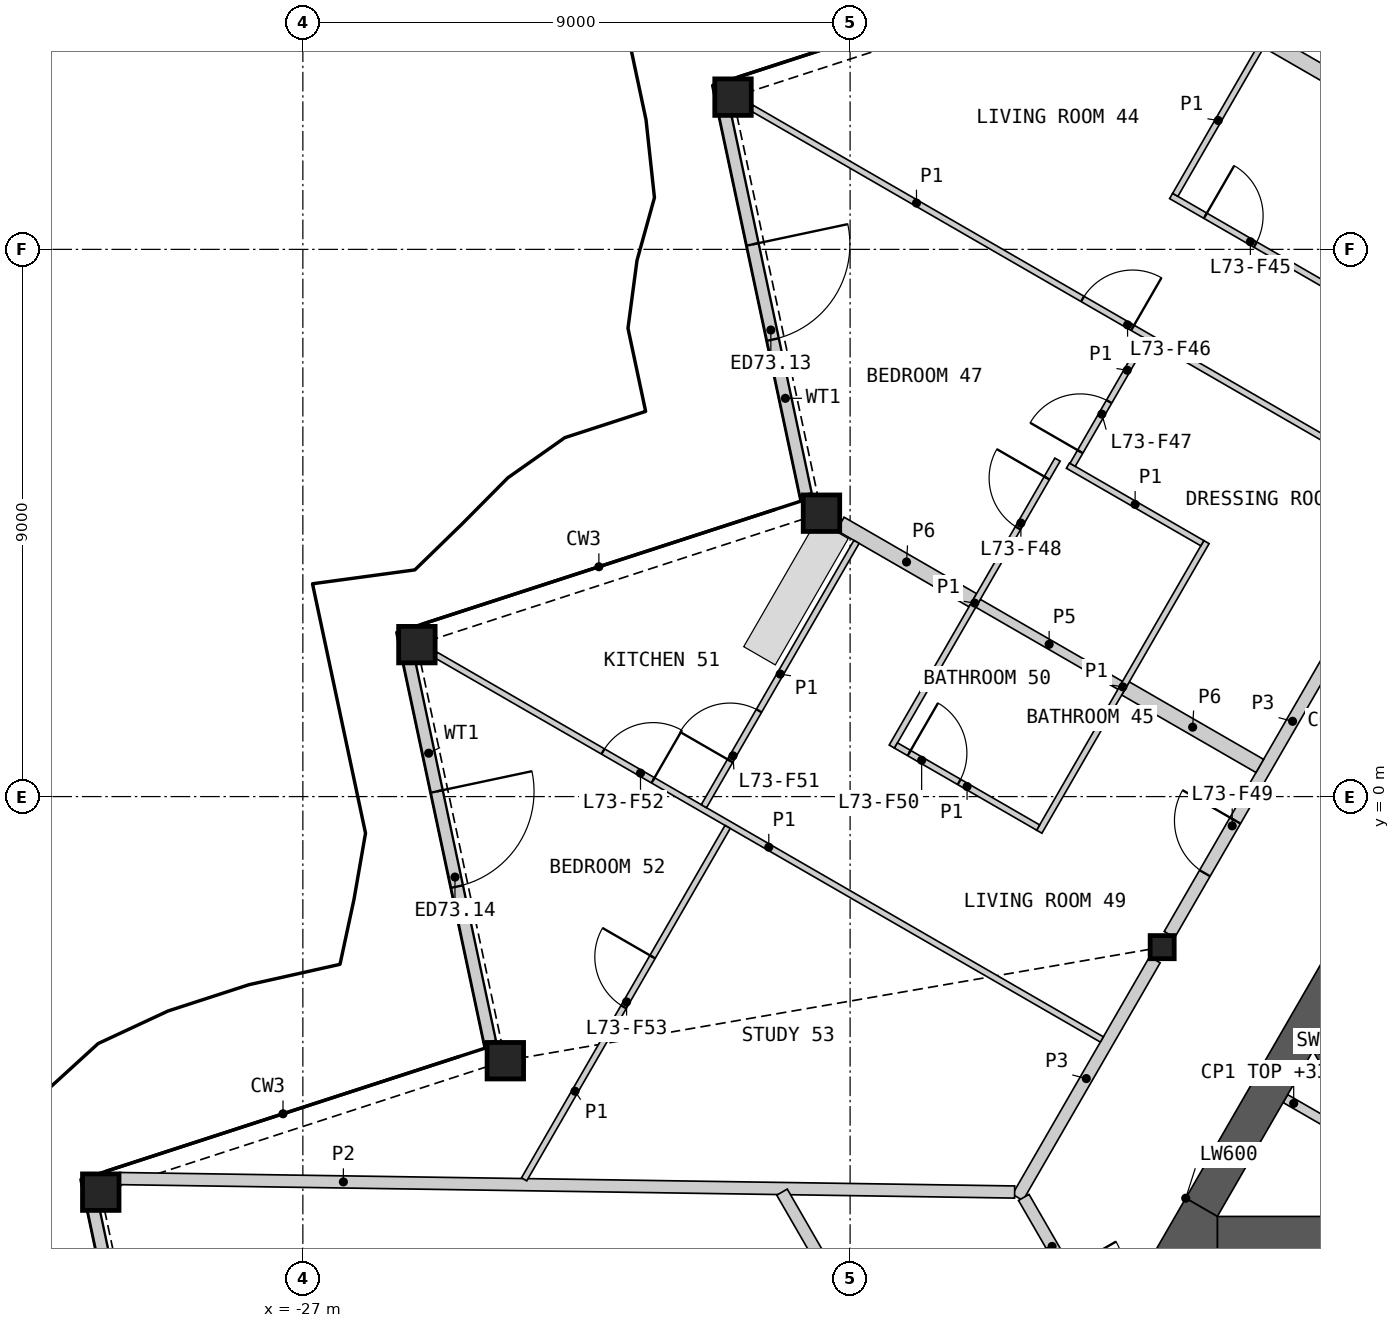
"""IFC4 building model, lengths in metres.
Left out: names, types, materials, properties, quantities, classifications, styles, units other than length and angle.
Written with IfcOpenShell. Run it as: python <this file> out.ifc"""

import sys

from ifc_helpers import new_model, si_unit, direction, frame, frame_2d, origin, origin_2d, place, context, subcontext, project, spatial, polyline, rectangle, hollow_rectangle, i_section, outline, extrude, element, fill, save


model = new_model("IFC4")
c1 = context("Model", 3, precision=1e-05, world=origin(), true_north=direction((0.0, 1.0)))
c2 = subcontext(c1, "Body", "Model", "MODEL_VIEW")
j1 = project(units=[si_unit("LENGTHUNIT", "METRE"), si_unit("PLANEANGLEUNIT", "RADIAN")], contexts=[c1])
p1 = place(None, origin())
s1 = spatial("IfcSite", under=j1, at=p1, CompositionType="ELEMENT")
p2 = place(p1, origin())
s2 = spatial("IfcBuilding", under=s1, at=p2, CompositionType="ELEMENT")
p3 = place(p2, frame((0.0, 0.0, 329.0)))
s3 = spatial("IfcBuildingStorey", under=s2, at=p3, CompositionType="ELEMENT", Elevation=329.0)
for number, where, z_axis, x_axis in (
    (1, (-19.926, 11.504, 0.0), (0.0, 0.0, 1.0), (1.0, 0.0, 0.0)),
    (2, (-18.471, 4.661, 0.0), (0.0, 0.0, 1.0), (1.0, 0.0, 0.0)),
    (3, (-25.125, 2.499, 0.0), (0.0, 0.0, 1.0), (1.0, 0.0, 0.0)),
    (4, (-23.67, -4.344, 0.0), (0.0, 0.0, 1.0), (1.0, 0.0, 0.0)),
    (5, (-30.324, -6.506, 0.0), (0.0, 0.0, 1.0), (1.0, 0.0, 0.0)),
):
    element("IfcColumn", number, at=place(p3, frame(where, z_axis=z_axis, x_axis=x_axis)), inside=s3, PredefinedType="COLUMN", context=c2, shape_type="SweptSolid", body=[
        extrude(hollow_rectangle(XDim=0.6, YDim=0.6, WallThickness=0.04, at=origin_2d()), origin(), (0.0, 0.0, 1.0), 3.4),
    ])
p4 = place(p3, frame((-12.868, -2.476, 0.0), z_axis=(0.0, 0.0, 1.0), x_axis=(1.0, 0.0, 0.0)))
e6 = element("IfcColumn", 6, at=p4, inside=s3, PredefinedType="COLUMN", context=c2, shape_type="SweptSolid", body=[
    extrude(i_section(OverallWidth=0.396, OverallDepth=0.381, WebThickness=0.019, FlangeThickness=0.03, at=origin_2d()), origin(), (0.0, 0.0, 1.0), 3.4),
])
p5 = place(p3, frame((-20.073, 11.294, 0.0), z_axis=(0.0, 0.0, 1.0), x_axis=(0.207893978909, -0.978151365349, 0.0)))
e7 = element("IfcWall", 7, at=p5, inside=s3, PredefinedType="SOLIDWALL", context=c2, shape_type="SweptSolid", body=[
    extrude(rectangle(XDim=6.466, YDim=0.2, at=frame_2d((3.233, 0.0))), origin(), (0.0, 0.0, 1.0), 2.488),
])
p6 = place(p5, frame((2.261, 0.0, 0.0)))
e8 = element("IfcOpeningElement", 8, at=p6, cuts=e7, PredefinedType="OPENING", context=c2, shape_type="SweptSolid", body=[
    extrude(rectangle(XDim=1.6, YDim=2.25, at=frame_2d((0.8, 1.125))), frame((0.0, 0.11, 0.0), z_axis=(0.0, -1.0, 0.0), x_axis=(1.0, 0.0, 0.0)), (0.0, 0.0, 1.0), 0.22),
])
p7 = place(p3, frame((-25.268, 2.297, 0.0), z_axis=(0.0, 0.0, 1.0), x_axis=(0.207937232358, -0.978142171363, 0.0)))
e9 = element("IfcWall", 9, at=p7, inside=s3, PredefinedType="SOLIDWALL", context=c2, shape_type="SweptSolid", body=[
    extrude(rectangle(XDim=6.474, YDim=0.2, at=frame_2d((3.237, 0.0))), origin(), (0.0, 0.0, 1.0), 2.488),
])
p8 = place(p7, frame((2.261, 0.0, 0.0)))
e10 = element("IfcOpeningElement", 10, at=p8, cuts=e9, PredefinedType="OPENING", context=c2, shape_type="SweptSolid", body=[
    extrude(rectangle(XDim=1.6, YDim=2.25, at=frame_2d((0.8, 1.125))), frame((0.0, 0.11, 0.0), z_axis=(0.0, -1.0, 0.0), x_axis=(1.0, 0.0, 0.0)), (0.0, 0.0, 1.0), 0.22),
])
p9 = place(p3, frame((-30.462, -6.701, 0.0), z_axis=(0.0, 0.0, 1.0), x_axis=(0.207915966693, -0.978146691859, 0.0)))
e11 = element("IfcWall", 11, at=p9, inside=s3, PredefinedType="SOLIDWALL", context=c2, shape_type="SweptSolid", body=[
    extrude(rectangle(XDim=6.482, YDim=0.2, at=frame_2d((3.241, 0.0))), origin(), (0.0, 0.0, 1.0), 2.488),
])
p10 = place(p9, frame((2.261, 0.0, 0.0)))
e12 = element("IfcOpeningElement", 12, at=p10, cuts=e11, PredefinedType="OPENING", context=c2, shape_type="SweptSolid", body=[
    extrude(rectangle(XDim=1.6, YDim=2.25, at=frame_2d((0.8, 1.125))), frame((0.0, 0.11, 0.0), z_axis=(0.0, -1.0, 0.0), x_axis=(1.0, 0.0, 0.0)), (0.0, 0.0, 1.0), 0.22),
])
p11 = place(p3, origin())
e13 = element("IfcWall", 13, at=p11, inside=s3, PredefinedType="SHEAR", context=c2, shape_type="SweptSolid", body=[
    extrude(outline(polyline([(-5.307, -1.281), (-10.374, -4.206), (-10.032, -4.298), (-5.182, -1.498), (-5.307, -1.281)])), origin(), (0.0, 0.0, 1.0), 3.1),
])
p12 = place(p3, origin())
e14 = element("IfcWall", 14, at=p12, inside=s3, PredefinedType="SHEAR", context=c2, shape_type="SweptSolid", body=[
    extrude(outline(polyline([(-10.374, -4.206), (-8.83, -6.881), (-8.738, -6.539), (-10.032, -4.298), (-10.374, -4.206)])), origin(), (0.0, 0.0, 1.0), 3.1),
])
p13 = place(p3, frame((-10.842, -4.967, 0.0), z_axis=(0.0, 0.0, 1.0), x_axis=(0.866098216386, -0.499873863663, 0.0)))
e15 = element("IfcWall", 15, at=p13, inside=s3, PredefinedType="PARTITIONING", context=c2, shape_type="SweptSolid", body=[
    extrude(rectangle(XDim=1.582, YDim=0.15, at=frame_2d((0.791, 0.0))), origin(), (0.0, 0.0, 1.0), 3.1),
])
p14 = place(p3, frame((-11.961, -7.206, 0.0), z_axis=(0.0, 0.0, 1.0), x_axis=(1.0, 0.0, 0.0)))
e16 = element("IfcWall", 16, at=p14, inside=s3, PredefinedType="SHEAR", context=c2, shape_type="SweptSolid", body=[
    extrude(rectangle(XDim=4.868, YDim=0.6, at=frame_2d((2.434, 0.0))), origin(), (0.0, 0.0, 1.0), 3.1),
])
p15 = place(p3, frame((-9.941, -2.807, 0.0), z_axis=(0.0, 0.0, 1.0), x_axis=(-0.500020646047, -0.866013483456, 0.0)))
e17 = element("IfcWall", 17, at=p15, inside=s3, PredefinedType="SHEAR", context=c2, shape_type="SweptSolid", body=[
    extrude(rectangle(XDim=4.559, YDim=0.6, at=frame_2d((2.28, 0.0))), origin(), (0.0, 0.0, 1.0), 3.1),
])
p16 = place(p3, origin())
e18 = element("IfcWall", 18, at=p16, inside=s3, PredefinedType="SHEAR", context=c2, shape_type="SweptSolid", body=[
    extrude(outline(polyline([(-12.48, -6.606), (-11.961, -6.906), (-11.961, -7.506), (-13.0, -7.506), (-12.48, -6.606)])), origin(), (0.0, 0.0, 1.0), 3.1),
])
p17 = place(p3, frame((-12.748, -2.269, 0.0), z_axis=(0.0, 0.0, 1.0), x_axis=(0.499984266882, 0.866034487114, 0.0)))
e19 = element("IfcWall", 19, at=p17, inside=s3, PredefinedType="PARTITIONING", context=c2, shape_type="SweptSolid", body=[
    extrude(rectangle(XDim=8.099, YDim=0.2, at=frame_2d((4.049, 0.0))), origin(), (0.0, 0.0, 1.0), 3.1),
])
p18 = place(p17, frame((1.164, 0.0, 0.0)))
e20 = element("IfcOpeningElement", 20, at=p18, cuts=e19, PredefinedType="OPENING", context=c2, shape_type="SweptSolid", body=[
    extrude(rectangle(XDim=1.0, YDim=2.1, at=frame_2d((0.5, 1.05))), frame((0.0, 0.11, 0.0), z_axis=(0.0, -1.0, 0.0), x_axis=(1.0, 0.0, 0.0)), (0.0, 0.0, 1.0), 0.22),
])
p19 = place(p3, frame((-12.962, 13.482, 0.0), z_axis=(0.0, 0.0, 1.0), x_axis=(0.866022671543, -0.50000473235, 0.0)))
e21 = element("IfcWall", 21, at=p19, inside=s3, PredefinedType="PARTITIONING", context=c2, shape_type="SweptSolid", body=[
    extrude(rectangle(XDim=7.961, YDim=0.25, at=frame_2d((3.98, 0.0))), origin(), (0.0, 0.0, 1.0), 2.33),
])
p20 = place(p3, frame((-15.244, -6.592, 0.0), z_axis=(0.0, 0.0, 1.0), x_axis=(0.49999094734, 0.866030630277, 0.0)))
e22 = element("IfcWall", 22, at=p20, inside=s3, PredefinedType="PARTITIONING", context=c2, shape_type="SweptSolid", body=[
    extrude(rectangle(XDim=4.513, YDim=0.2, at=frame_2d((2.256, 0.0))), origin(), (0.0, 0.0, 1.0), 3.1),
])
p21 = place(p3, frame((-15.144, -6.592, 0.0), z_axis=(0.0, 0.0, 1.0), x_axis=(0.499958791762, -0.866049194065, 0.0)))
e23 = element("IfcWall", 23, at=p21, inside=s3, PredefinedType="PARTITIONING", context=c2, shape_type="SweptSolid", body=[
    extrude(rectangle(XDim=3.726, YDim=0.2, at=frame_2d((1.863, 0.0))), origin(), (0.0, 0.0, 1.0), 3.1),
])
p22 = place(p21, frame((1.388, 0.0, 0.0)))
e24 = element("IfcOpeningElement", 24, at=p22, cuts=e23, PredefinedType="OPENING", context=c2, shape_type="SweptSolid", body=[
    extrude(rectangle(XDim=0.95, YDim=2.1, at=frame_2d((0.475, 1.05))), frame((0.0, 0.11, 0.0), z_axis=(0.0, -1.0, 0.0), x_axis=(1.0, 0.0, 0.0)), (0.0, 0.0, 1.0), 0.22),
])
p23 = place(p3, frame((-13.471, 1.779, 0.0), z_axis=(0.0, 0.0, 1.0), x_axis=(0.865989465428, -0.500062241894, 0.0)))
e25 = element("IfcWall", 25, at=p23, inside=s3, PredefinedType="PARTITIONING", context=c2, shape_type="SweptSolid", body=[
    extrude(rectangle(XDim=2.55, YDim=0.25, at=frame_2d((1.275, 0.0))), origin(), (0.0, 0.0, 1.0), 2.33),
])
p24 = place(p3, frame((-18.161, 4.487, 0.0), z_axis=(0.0, 0.0, 1.0), x_axis=(0.866012646713, -0.500022095245, 0.0)))
e26 = element("IfcWall", 26, at=p24, inside=s3, PredefinedType="PARTITIONING", context=c2, shape_type="SweptSolid", body=[
    extrude(rectangle(XDim=2.516, YDim=0.25, at=frame_2d((1.258, 0.0))), origin(), (0.0, 0.0, 1.0), 2.33),
])
p25 = place(p3, frame((-30.014, -6.282, 0.0), z_axis=(0.0, 0.0, 1.0), x_axis=(0.99988686643, -0.015041753265, 0.0)))
e27 = element("IfcWall", 27, at=p25, inside=s3, PredefinedType="PARTITIONING", context=c2, shape_type="SweptSolid", body=[
    extrude(rectangle(XDim=14.721, YDim=0.2, at=frame_2d((7.361, 0.0))), origin(), (0.0, 0.0, 1.0), 2.33),
])
p26 = place(p3, frame((-19.12, -6.506, 0.0), z_axis=(0.0, 0.0, 1.0), x_axis=(0.499978535015, -0.866037796245, 0.0)))
e28 = element("IfcWall", 28, at=p26, inside=s3, PredefinedType="PARTITIONING", context=c2, shape_type="SweptSolid", body=[
    extrude(rectangle(XDim=3.686, YDim=0.2, at=frame_2d((1.843, 0.0))), origin(), (0.0, 0.0, 1.0), 2.33),
])
p27 = place(p3, frame((-15.896, 3.179, 0.0), z_axis=(0.0, 0.0, 1.0), x_axis=(0.866059108428, -0.4999416173, 0.0)))
e29 = element("IfcWall", 29, at=p27, inside=s3, PredefinedType="PLUMBINGWALL", context=c2, shape_type="SweptSolid", body=[
    extrude(rectangle(XDim=2.7, YDim=0.15, at=frame_2d((1.35, 0.0))), origin(), (0.0, 0.0, 1.0), 2.33),
])
p28 = place(p3, frame((-24.815, 2.33, 0.0), z_axis=(0.0, 0.0, 1.0), x_axis=(0.866027776657, -0.499995890042, 0.0)))
e30 = element("IfcWall", 30, at=p28, inside=s3, PredefinedType="PARTITIONING", context=c2, shape_type="SweptSolid", body=[
    extrude(rectangle(XDim=12.649, YDim=0.1, at=frame_2d((6.325, 0.0))), origin(), (0.0, 0.0, 1.0), 2.33),
])
p29 = place(p28, frame((3.176, 0.0, 0.0)))
e31 = element("IfcOpeningElement", 31, at=p29, cuts=e30, PredefinedType="OPENING", context=c2, shape_type="SweptSolid", body=[
    extrude(rectangle(XDim=0.95, YDim=2.1, at=frame_2d((0.475, 1.05))), frame((0.0, 0.06, 0.0), z_axis=(0.0, -1.0, 0.0), x_axis=(1.0, 0.0, 0.0)), (0.0, 0.0, 1.0), 0.12),
])
p30 = place(p3, frame((-19.615, 11.325, 0.0), z_axis=(0.0, 0.0, 1.0), x_axis=(0.86602139559, -0.500006942333, 0.0)))
e32 = element("IfcWall", 32, at=p30, inside=s3, PredefinedType="PARTITIONING", context=c2, shape_type="SweptSolid", body=[
    extrude(rectangle(XDim=12.505, YDim=0.1, at=frame_2d((6.252, 0.0))), origin(), (0.0, 0.0, 1.0), 2.33),
])
p31 = place(p30, frame((6.28, 0.0, 0.0)))
e33 = element("IfcOpeningElement", 33, at=p31, cuts=e32, PredefinedType="OPENING", context=c2, shape_type="SweptSolid", body=[
    extrude(rectangle(XDim=0.95, YDim=2.1, at=frame_2d((0.475, 1.05))), frame((0.0, 0.06, 0.0), z_axis=(0.0, -1.0, 0.0), x_axis=(1.0, 0.0, 0.0)), (0.0, 0.0, 1.0), 0.12),
])
p32 = place(p3, frame((-23.361, -6.295, 0.0), z_axis=(0.0, 0.0, 1.0), x_axis=(0.499987686533, 0.866032512851, 0.0)))
e34 = element("IfcWall", 34, at=p32, inside=s3, PredefinedType="PARTITIONING", context=c2, shape_type="SweptSolid", body=[
    extrude(rectangle(XDim=6.693, YDim=0.1, at=frame_2d((3.347, 0.0))), origin(), (0.0, 0.0, 1.0), 2.33),
])
p33 = place(p32, frame((3.275, 0.0, 0.0)))
e35 = element("IfcOpeningElement", 35, at=p33, cuts=e34, PredefinedType="OPENING", context=c2, shape_type="SweptSolid", body=[
    extrude(rectangle(XDim=0.95, YDim=2.1, at=frame_2d((0.475, 1.05))), frame((0.0, 0.06, 0.0), z_axis=(0.0, -1.0, 0.0), x_axis=(1.0, 0.0, 0.0)), (0.0, 0.0, 1.0), 0.12),
])
p34 = place(p3, frame((-12.721, 9.878, 0.0), z_axis=(0.0, 0.0, 1.0), x_axis=(0.866027751316, -0.499995933934, 0.0)))
e36 = element("IfcWall", 36, at=p34, inside=s3, PredefinedType="PARTITIONING", context=c2, shape_type="SweptSolid", body=[
    extrude(rectangle(XDim=5.95, YDim=0.1, at=frame_2d((2.975, 0.0))), origin(), (0.0, 0.0, 1.0), 2.33),
])
p35 = place(p34, frame((0.65, 0.0, 0.0)))
e37 = element("IfcOpeningElement", 37, at=p35, cuts=e36, PredefinedType="OPENING", context=c2, shape_type="SweptSolid", body=[
    extrude(rectangle(XDim=0.95, YDim=2.1, at=frame_2d((0.475, 1.05))), frame((0.0, 0.06, 0.0), z_axis=(0.0, -1.0, 0.0), x_axis=(1.0, 0.0, 0.0)), (0.0, 0.0, 1.0), 0.12),
])
p36 = place(p3, frame((-17.314, 0.823, 0.0), z_axis=(0.0, 0.0, 1.0), x_axis=(0.499988730927, 0.866031909889, 0.0)))
e38 = element("IfcWall", 38, at=p36, inside=s3, PredefinedType="PARTITIONING", context=c2, shape_type="SweptSolid", body=[
    extrude(rectangle(XDim=5.45, YDim=0.1, at=frame_2d((2.725, 0.0))), origin(), (0.0, 0.0, 1.0), 2.33),
])
p37 = place(p36, frame((4.15, 0.0, 0.0)))
e39 = element("IfcOpeningElement", 39, at=p37, cuts=e38, PredefinedType="OPENING", context=c2, shape_type="SweptSolid", body=[
    extrude(rectangle(XDim=0.95, YDim=2.1, at=frame_2d((0.475, 1.05))), frame((0.0, 0.06, 0.0), z_axis=(0.0, -1.0, 0.0), x_axis=(1.0, 0.0, 0.0)), (0.0, 0.0, 1.0), 0.12),
])
p38 = place(p3, frame((-14.889, -0.577, 0.0), z_axis=(0.0, 0.0, 1.0), x_axis=(0.500015767406, 0.866016300277, 0.0)))
e40 = element("IfcWall", 40, at=p38, inside=s3, PredefinedType="PARTITIONING", context=c2, shape_type="SweptSolid", body=[
    extrude(rectangle(XDim=5.5, YDim=0.1, at=frame_2d((2.75, 0.0))), origin(), (0.0, 0.0, 1.0), 2.33),
])
p39 = place(p3, frame((-20.405, -0.158, 0.0), z_axis=(0.0, 0.0, 1.0), x_axis=(0.499989096993, 0.866031698547, 0.0)))
e41 = element("IfcWall", 41, at=p39, inside=s3, PredefinedType="PARTITIONING", context=c2, shape_type="SweptSolid", body=[
    extrude(rectangle(XDim=5.02, YDim=0.1, at=frame_2d((2.51, 0.0))), origin(), (0.0, 0.0, 1.0), 2.33),
])
p40 = place(p39, frame((0.862, 0.0, 0.0)))
e42 = element("IfcOpeningElement", 42, at=p40, cuts=e41, PredefinedType="OPENING", context=c2, shape_type="SweptSolid", body=[
    extrude(rectangle(XDim=0.95, YDim=2.1, at=frame_2d((0.475, 1.05))), frame((0.0, 0.06, 0.0), z_axis=(0.0, -1.0, 0.0), x_axis=(1.0, 0.0, 0.0)), (0.0, 0.0, 1.0), 0.12),
])
p41 = place(p3, frame((-12.652, 9.897, 0.0), z_axis=(0.0, 0.0, 1.0), x_axis=(0.500024172624, 0.866011447264, 0.0)))
e43 = element("IfcWall", 43, at=p41, inside=s3, PredefinedType="PARTITIONING", context=c2, shape_type="SweptSolid", body=[
    extrude(rectangle(XDim=2.825, YDim=0.1, at=frame_2d((1.413, 0.0))), origin(), (0.0, 0.0, 1.0), 2.33),
])
p42 = place(p3, frame((-17.246, 0.841, 0.0), z_axis=(0.0, 0.0, 1.0), x_axis=(0.86599734893, -0.500048589285, 0.0)))
e44 = element("IfcWall", 44, at=p42, inside=s3, PredefinedType="PARTITIONING", context=c2, shape_type="SweptSolid", body=[
    extrude(rectangle(XDim=2.7, YDim=0.1, at=frame_2d((1.35, 0.0))), origin(), (0.0, 0.0, 1.0), 2.33),
])
p43 = place(p42, frame((0.25, 0.0, 0.0)))
e45 = element("IfcOpeningElement", 45, at=p43, cuts=e44, PredefinedType="OPENING", context=c2, shape_type="SweptSolid", body=[
    extrude(rectangle(XDim=0.95, YDim=2.1, at=frame_2d((0.475, 1.05))), frame((0.0, 0.06, 0.0), z_axis=(0.0, -1.0, 0.0), x_axis=(1.0, 0.0, 0.0)), (0.0, 0.0, 1.0), 0.12),
])
p44 = place(p3, frame((-14.417, 5.443, 0.0), z_axis=(0.0, 0.0, 1.0), x_axis=(0.865991210529, -0.500059219779, 0.0)))
e46 = element("IfcWall", 46, at=p44, inside=s3, PredefinedType="PARTITIONING", context=c2, shape_type="SweptSolid", body=[
    extrude(rectangle(XDim=2.552, YDim=0.1, at=frame_2d((1.276, 0.0))), origin(), (0.0, 0.0, 1.0), 2.33),
])
p45 = place(p3, frame((-14.341, 5.457, 0.0), z_axis=(0.0, 0.0, 1.0), x_axis=(0.499954846121, 0.866051471819, 0.0)))
e47 = element("IfcWall", 47, at=p45, inside=s3, PredefinedType="PARTITIONING", context=c2, shape_type="SweptSolid", body=[
    extrude(rectangle(XDim=2.395, YDim=0.1, at=frame_2d((1.197, 0.0))), origin(), (0.0, 0.0, 1.0), 2.33),
])
p46 = place(p45, frame((0.25, 0.0, 0.0)))
e48 = element("IfcOpeningElement", 48, at=p46, cuts=e47, PredefinedType="OPENING", context=c2, shape_type="SweptSolid", body=[
    extrude(rectangle(XDim=0.95, YDim=2.1, at=frame_2d((0.475, 1.05))), frame((0.0, 0.06, 0.0), z_axis=(0.0, -1.0, 0.0), x_axis=(1.0, 0.0, 0.0)), (0.0, 0.0, 1.0), 0.12),
])
p47 = place(p6, origin())
e49 = element("IfcDoor", 49, at=p47, inside=s3, OperationType="DOUBLE_DOOR_SINGLE_SWING", PredefinedType="DOOR", context=c2, shape_type="SweptSolid", body=[
    extrude(rectangle(XDim=1.6, YDim=2.25, at=frame_2d((0.8, 1.125))), frame((0.0, 0.025, 0.0), z_axis=(0.0, -1.0, 0.0), x_axis=(1.0, 0.0, 0.0)), (0.0, 0.0, 1.0), 0.05),
])
fill(e8, e49)
p48 = place(p8, origin())
e50 = element("IfcDoor", 50, at=p48, inside=s3, OperationType="DOUBLE_DOOR_SINGLE_SWING", PredefinedType="DOOR", context=c2, shape_type="SweptSolid", body=[
    extrude(rectangle(XDim=1.6, YDim=2.25, at=frame_2d((0.8, 1.125))), frame((0.0, 0.025, 0.0), z_axis=(0.0, -1.0, 0.0), x_axis=(1.0, 0.0, 0.0)), (0.0, 0.0, 1.0), 0.05),
])
fill(e10, e50)
p49 = place(p35, origin())
e51 = element("IfcDoor", 51, at=p49, inside=s3, OperationType="SINGLE_SWING_LEFT", PredefinedType="DOOR", context=c2, shape_type="SweptSolid", body=[
    extrude(rectangle(XDim=0.95, YDim=2.1, at=frame_2d((0.475, 1.05))), frame((0.0, 0.025, 0.0), z_axis=(0.0, -1.0, 0.0), x_axis=(1.0, 0.0, 0.0)), (0.0, 0.0, 1.0), 0.05),
])
fill(e37, e51)
p50 = place(p31, origin())
e52 = element("IfcDoor", 52, at=p50, inside=s3, OperationType="SINGLE_SWING_RIGHT", PredefinedType="DOOR", context=c2, shape_type="SweptSolid", body=[
    extrude(rectangle(XDim=0.95, YDim=2.1, at=frame_2d((0.475, 1.05))), frame((0.0, 0.025, 0.0), z_axis=(0.0, -1.0, 0.0), x_axis=(1.0, 0.0, 0.0)), (0.0, 0.0, 1.0), 0.05),
])
fill(e33, e52)
p51 = place(p46, origin())
e53 = element("IfcDoor", 53, at=p51, inside=s3, OperationType="SINGLE_SWING_LEFT", PredefinedType="DOOR", context=c2, shape_type="SweptSolid", body=[
    extrude(rectangle(XDim=0.95, YDim=2.1, at=frame_2d((0.475, 1.05))), frame((0.0, 0.025, 0.0), z_axis=(0.0, -1.0, 0.0), x_axis=(1.0, 0.0, 0.0)), (0.0, 0.0, 1.0), 0.05),
])
fill(e48, e53)
p52 = place(p37, origin())
e54 = element("IfcDoor", 54, at=p52, inside=s3, OperationType="SINGLE_SWING_RIGHT", PredefinedType="DOOR", context=c2, shape_type="SweptSolid", body=[
    extrude(rectangle(XDim=0.95, YDim=2.1, at=frame_2d((0.475, 1.05))), frame((0.0, 0.025, 0.0), z_axis=(0.0, -1.0, 0.0), x_axis=(1.0, 0.0, 0.0)), (0.0, 0.0, 1.0), 0.05),
])
fill(e39, e54)
p53 = place(p18, origin())
e55 = element("IfcDoor", 55, at=p53, inside=s3, OperationType="SINGLE_SWING_RIGHT", PredefinedType="DOOR", context=c2, shape_type="SweptSolid", body=[
    extrude(rectangle(XDim=1.0, YDim=2.1, at=frame_2d((0.5, 1.05))), frame((0.0, 0.025, 0.0), z_axis=(0.0, -1.0, 0.0), x_axis=(1.0, 0.0, 0.0)), (0.0, 0.0, 1.0), 0.05),
])
fill(e20, e55)
p54 = place(p43, origin())
e56 = element("IfcDoor", 56, at=p54, inside=s3, OperationType="SINGLE_SWING_LEFT", PredefinedType="DOOR", context=c2, shape_type="SweptSolid", body=[
    extrude(rectangle(XDim=0.95, YDim=2.1, at=frame_2d((0.475, 1.05))), frame((0.0, 0.025, 0.0), z_axis=(0.0, -1.0, 0.0), x_axis=(1.0, 0.0, 0.0)), (0.0, 0.0, 1.0), 0.05),
])
fill(e45, e56)
p55 = place(p40, origin())
e57 = element("IfcDoor", 57, at=p55, inside=s3, OperationType="SINGLE_SWING_LEFT", PredefinedType="DOOR", context=c2, shape_type="SweptSolid", body=[
    extrude(rectangle(XDim=0.95, YDim=2.1, at=frame_2d((0.475, 1.05))), frame((0.0, 0.025, 0.0), z_axis=(0.0, -1.0, 0.0), x_axis=(1.0, 0.0, 0.0)), (0.0, 0.0, 1.0), 0.05),
])
fill(e42, e57)
p56 = place(p29, origin())
e58 = element("IfcDoor", 58, at=p56, inside=s3, OperationType="SINGLE_SWING_RIGHT", PredefinedType="DOOR", context=c2, shape_type="SweptSolid", body=[
    extrude(rectangle(XDim=0.95, YDim=2.1, at=frame_2d((0.475, 1.05))), frame((0.0, 0.025, 0.0), z_axis=(0.0, -1.0, 0.0), x_axis=(1.0, 0.0, 0.0)), (0.0, 0.0, 1.0), 0.05),
])
fill(e31, e58)
p57 = place(p33, origin())
e59 = element("IfcDoor", 59, at=p57, inside=s3, OperationType="SINGLE_SWING_RIGHT", PredefinedType="DOOR", context=c2, shape_type="SweptSolid", body=[
    extrude(rectangle(XDim=0.95, YDim=2.1, at=frame_2d((0.475, 1.05))), frame((0.0, 0.025, 0.0), z_axis=(0.0, -1.0, 0.0), x_axis=(1.0, 0.0, 0.0)), (0.0, 0.0, 1.0), 0.05),
])
fill(e35, e59)
save(model, sys.argv[1])
